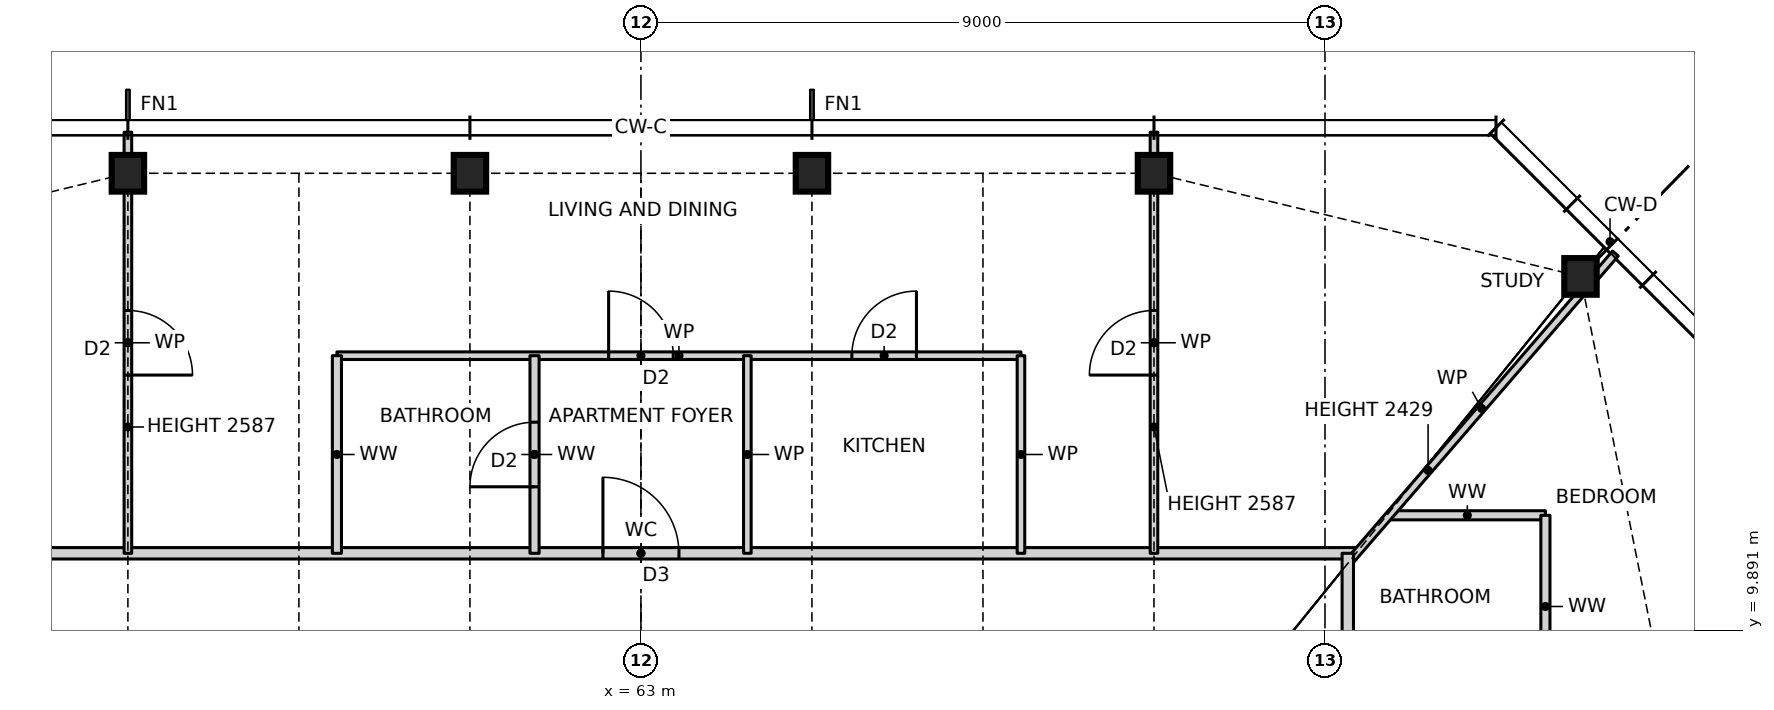
"""IFC4 building model, lengths in metres.
Left out: names, types, materials, properties, quantities, classifications, styles, units other than length and angle.
Written with IfcOpenShell. Run it as: python <this file> out.ifc"""

import sys

from ifc_helpers import new_model, si_unit, direction, frame, frame_2d, origin, origin_2d, place, context, subcontext, project, spatial, rectangle, i_section, extrude, element, fill, save


model = new_model("IFC4")
c1 = context("Model", 3, precision=1e-05, world=origin(), true_north=direction((0.0, 1.0)))
c2 = subcontext(c1, "Body", "Model", "MODEL_VIEW")
j1 = project(units=[si_unit("LENGTHUNIT", "METRE"), si_unit("PLANEANGLEUNIT", "RADIAN")], contexts=[c1])
p1 = place(None, origin())
s1 = spatial("IfcSite", under=j1, at=p1, CompositionType="ELEMENT")
p2 = place(p1, origin())
s2 = spatial("IfcBuilding", under=s1, at=p2, CompositionType="ELEMENT")
p3 = place(p2, frame((0.0, 0.0, 101.5)))
s3 = spatial("IfcBuildingStorey", under=s2, at=p3, CompositionType="ELEMENT", Elevation=101.5)
for number, where, z_axis, x_axis in (
    (1, (75.361, 14.543, 0.0), (0.0, 0.0, 1.0), (1.0, 0.0, 0.0)),
    (2, (69.75, 15.9, 0.0), (0.0, 0.0, 1.0), (1.0, 0.0, 0.0)),
    (3, (65.25, 15.9, 0.0), (0.0, 0.0, 1.0), (1.0, 0.0, 0.0)),
    (4, (60.75, 15.9, 0.0), (0.0, 0.0, 1.0), (1.0, 0.0, 0.0)),
    (5, (56.25, 15.9, 0.0), (0.0, 0.0, 1.0), (1.0, 0.0, 0.0)),
):
    element("IfcColumn", number, at=place(p3, frame(where, z_axis=z_axis, x_axis=x_axis)), inside=s3, PredefinedType="COLUMN", context=c2, shape_type="SweptSolid", body=[
        extrude(i_section(OverallWidth=0.427, OverallDepth=0.483, WebThickness=0.051, FlangeThickness=0.082, at=origin_2d()), origin(), (0.0, 0.0, 1.0), 3.5),
    ])
p4 = place(p3, frame((53.586, 10.9, 0.0), z_axis=(0.0, 0.0, 1.0), x_axis=(1.0, 0.0, 0.0)))
e6 = element("IfcWall", 6, at=p4, inside=s3, PredefinedType="PARTITIONING", context=c2, shape_type="SweptSolid", body=[
    extrude(rectangle(XDim=18.828, YDim=0.15, at=frame_2d((9.414, 0.0))), origin(), (0.0, 0.0, 1.0), 3.27),
])
p5 = place(p4, frame((8.914, 0.0, 0.0)))
e7 = element("IfcOpeningElement", 7, at=p5, cuts=e6, PredefinedType="OPENING", context=c2, shape_type="SweptSolid", body=[
    extrude(rectangle(XDim=1.0, YDim=2.1, at=frame_2d((0.5, 1.05))), frame((0.0, 0.085, 0.0), z_axis=(0.0, -1.0, 0.0), x_axis=(1.0, 0.0, 0.0)), (0.0, 0.0, 1.0), 0.17),
])
p6 = place(p3, frame((72.845, 11.4, 0.0), z_axis=(0.0, 0.0, 1.0), x_axis=(1.0, 0.0, 0.0)))
e8 = element("IfcWall", 8, at=p6, inside=s3, PredefinedType="PARTITIONING", context=c2, shape_type="SweptSolid", body=[
    extrude(rectangle(XDim=2.055, YDim=0.12, at=frame_2d((1.027, 0.0))), origin(), (0.0, 0.0, 1.0), 3.27),
])
p7 = place(p3, frame((59.0, 13.5, 0.0), z_axis=(0.0, 0.0, 1.0), x_axis=(1.0, 0.0, 0.0)))
e9 = element("IfcWall", 9, at=p7, inside=s3, PredefinedType="PARTITIONING", context=c2, shape_type="SweptSolid", body=[
    extrude(rectangle(XDim=9.0, YDim=0.1, at=frame_2d((4.5, 0.0))), origin(), (0.0, 0.0, 1.0), 3.27),
])
p8 = place(p7, frame((6.775, 0.0, 0.0)))
e10 = element("IfcOpeningElement", 10, at=p8, cuts=e9, PredefinedType="OPENING", context=c2, shape_type="SweptSolid", body=[
    extrude(rectangle(XDim=0.85, YDim=2.1, at=frame_2d((0.425, 1.05))), frame((0.0, 0.06, 0.0), z_axis=(0.0, -1.0, 0.0), x_axis=(1.0, 0.0, 0.0)), (0.0, 0.0, 1.0), 0.12),
])
p9 = place(p7, frame((3.575, 0.0, 0.0)))
e11 = element("IfcOpeningElement", 11, at=p9, cuts=e9, PredefinedType="OPENING", context=c2, shape_type="SweptSolid", body=[
    extrude(rectangle(XDim=0.85, YDim=2.1, at=frame_2d((0.425, 1.05))), frame((0.0, 0.06, 0.0), z_axis=(0.0, -1.0, 0.0), x_axis=(1.0, 0.0, 0.0)), (0.0, 0.0, 1.0), 0.12),
])
p10 = place(p3, frame((72.3, 10.768, 0.0), z_axis=(0.0, 0.0, 1.0), x_axis=(0.653709560919, 0.756745538449, 0.0)))
e12 = element("IfcWall", 12, at=p10, inside=s3, PredefinedType="PARTITIONING", context=c2, shape_type="SweptSolid", body=[
    extrude(rectangle(XDim=5.386, YDim=0.1, at=frame_2d((2.693, 0.0))), origin(), (0.0, 0.0, 1.0), 2.429),
])
p11 = place(p3, frame((74.9, 9.0, 0.0), z_axis=(0.0, 0.0, 1.0), x_axis=(0.0, 1.0, 0.0)))
e13 = element("IfcWall", 13, at=p11, inside=s3, PredefinedType="PARTITIONING", context=c2, shape_type="SweptSolid", body=[
    extrude(rectangle(XDim=2.4, YDim=0.12, at=frame_2d((1.2, 0.0))), origin(), (0.0, 0.0, 1.0), 3.27),
])
p12 = place(p3, frame((72.3, -10.768, 0.0), z_axis=(0.0, 0.0, 1.0), x_axis=(0.0, 1.0, 0.0)))
e14 = element("IfcWall", 14, at=p12, inside=s3, PredefinedType="PARTITIONING", context=c2, shape_type="SweptSolid", body=[
    extrude(rectangle(XDim=21.668, YDim=0.15, at=frame_2d((10.834, 0.0))), origin(), (0.0, 0.0, 1.0), 3.27),
])
p13 = place(p12, frame((6.268, 0.0, 0.0)))
e15 = element("IfcOpeningElement", 15, at=p13, cuts=e14, PredefinedType="OPENING", context=c2, shape_type="SweptSolid", body=[
    extrude(rectangle(XDim=1.0, YDim=2.1, at=frame_2d((0.5, 1.05))), frame((0.0, 0.085, 0.0), z_axis=(0.0, -1.0, 0.0), x_axis=(1.0, 0.0, 0.0)), (0.0, 0.0, 1.0), 0.17),
])
p14 = place(p12, frame((16.168, 0.0, 0.0)))
e16 = element("IfcOpeningElement", 16, at=p14, cuts=e14, PredefinedType="OPENING", context=c2, shape_type="SweptSolid", body=[
    extrude(rectangle(XDim=1.0, YDim=2.1, at=frame_2d((0.5, 1.05))), frame((0.0, 0.085, 0.0), z_axis=(0.0, -1.0, 0.0), x_axis=(1.0, 0.0, 0.0)), (0.0, 0.0, 1.0), 0.17),
])
p15 = place(p3, frame((69.75, 10.9, 0.0), z_axis=(0.0, 0.0, 1.0), x_axis=(0.0, 1.0, 0.0)))
e17 = element("IfcWall", 17, at=p15, inside=s3, PredefinedType="PARTITIONING", context=c2, shape_type="SweptSolid", body=[
    extrude(rectangle(XDim=5.54, YDim=0.1, at=frame_2d((2.77, 0.0))), origin(), (0.0, 0.0, 1.0), 2.587),
])
p16 = place(p15, frame((2.345, 0.0, 0.0)))
e18 = element("IfcOpeningElement", 18, at=p16, cuts=e17, PredefinedType="OPENING", context=c2, shape_type="SweptSolid", body=[
    extrude(rectangle(XDim=0.85, YDim=2.1, at=frame_2d((0.425, 1.05))), frame((0.0, 0.06, 0.0), z_axis=(0.0, -1.0, 0.0), x_axis=(1.0, 0.0, 0.0)), (0.0, 0.0, 1.0), 0.12),
])
for number, where, z_axis, x_axis in (
    (19, (68.0, 10.9, 0.0), (0.0, 0.0, 1.0), (0.0, 1.0, 0.0)),
    (20, (64.4, 10.9, 0.0), (0.0, 0.0, 1.0), (0.0, 1.0, 0.0)),
):
    element("IfcWall", number, at=place(p3, frame(where, z_axis=z_axis, x_axis=x_axis)), inside=s3, PredefinedType="PARTITIONING", context=c2, shape_type="SweptSolid", body=[
        extrude(rectangle(XDim=2.6, YDim=0.1, at=frame_2d((1.3, 0.0))), origin(), (0.0, 0.0, 1.0), 3.27),
    ])
p17 = place(p3, frame((61.6, 10.9, 0.0), z_axis=(0.0, 0.0, 1.0), x_axis=(0.0, 1.0, 0.0)))
e21 = element("IfcWall", 21, at=p17, inside=s3, PredefinedType="PARTITIONING", context=c2, shape_type="SweptSolid", body=[
    extrude(rectangle(XDim=2.6, YDim=0.12, at=frame_2d((1.3, 0.0))), origin(), (0.0, 0.0, 1.0), 3.27),
])
p18 = place(p17, frame((0.875, 0.0, 0.0)))
e22 = element("IfcOpeningElement", 22, at=p18, cuts=e21, PredefinedType="OPENING", context=c2, shape_type="SweptSolid", body=[
    extrude(rectangle(XDim=0.85, YDim=2.1, at=frame_2d((0.425, 1.05))), frame((0.0, 0.07, 0.0), z_axis=(0.0, -1.0, 0.0), x_axis=(1.0, 0.0, 0.0)), (0.0, 0.0, 1.0), 0.14),
])
p19 = place(p3, frame((59.0, 10.9, 0.0), z_axis=(0.0, 0.0, 1.0), x_axis=(0.0, 1.0, 0.0)))
e23 = element("IfcWall", 23, at=p19, inside=s3, PredefinedType="PARTITIONING", context=c2, shape_type="SweptSolid", body=[
    extrude(rectangle(XDim=2.6, YDim=0.12, at=frame_2d((1.3, 0.0))), origin(), (0.0, 0.0, 1.0), 3.27),
])
p20 = place(p3, frame((56.25, 10.9, 0.0), z_axis=(0.0, 0.0, 1.0), x_axis=(0.0, 1.0, 0.0)))
e24 = element("IfcWall", 24, at=p20, inside=s3, PredefinedType="PARTITIONING", context=c2, shape_type="SweptSolid", body=[
    extrude(rectangle(XDim=5.54, YDim=0.1, at=frame_2d((2.77, 0.0))), origin(), (0.0, 0.0, 1.0), 2.587),
])
p21 = place(p20, frame((2.345, 0.0, 0.0)))
e25 = element("IfcOpeningElement", 25, at=p21, cuts=e24, PredefinedType="OPENING", context=c2, shape_type="SweptSolid", body=[
    extrude(rectangle(XDim=0.85, YDim=2.1, at=frame_2d((0.425, 1.05))), frame((0.0, 0.06, 0.0), z_axis=(0.0, -1.0, 0.0), x_axis=(1.0, 0.0, 0.0)), (0.0, 0.0, 1.0), 0.12),
])
p22 = place(p8, origin())
e26 = element("IfcDoor", 26, at=p22, inside=s3, OperationType="SINGLE_SWING_RIGHT", PredefinedType="DOOR", context=c2, shape_type="SweptSolid", body=[
    extrude(rectangle(XDim=0.85, YDim=2.1, at=frame_2d((0.425, 1.05))), frame((0.0, 0.025, 0.0), z_axis=(0.0, -1.0, 0.0), x_axis=(1.0, 0.0, 0.0)), (0.0, 0.0, 1.0), 0.05),
])
fill(e10, e26)
p23 = place(p5, origin())
e27 = element("IfcDoor", 27, at=p23, inside=s3, OperationType="SINGLE_SWING_LEFT", PredefinedType="DOOR", context=c2, shape_type="SweptSolid", body=[
    extrude(rectangle(XDim=1.0, YDim=2.1, at=frame_2d((0.5, 1.05))), frame((0.0, 0.025, 0.0), z_axis=(0.0, -1.0, 0.0), x_axis=(1.0, 0.0, 0.0)), (0.0, 0.0, 1.0), 0.05),
])
fill(e7, e27)
p24 = place(p9, origin())
e28 = element("IfcDoor", 28, at=p24, inside=s3, OperationType="SINGLE_SWING_LEFT", PredefinedType="DOOR", context=c2, shape_type="SweptSolid", body=[
    extrude(rectangle(XDim=0.85, YDim=2.1, at=frame_2d((0.425, 1.05))), frame((0.0, 0.025, 0.0), z_axis=(0.0, -1.0, 0.0), x_axis=(1.0, 0.0, 0.0)), (0.0, 0.0, 1.0), 0.05),
])
fill(e11, e28)
p25 = place(p18, origin())
e29 = element("IfcDoor", 29, at=p25, inside=s3, OperationType="SINGLE_SWING_LEFT", PredefinedType="DOOR", context=c2, shape_type="SweptSolid", body=[
    extrude(rectangle(XDim=0.85, YDim=2.1, at=frame_2d((0.425, 1.05))), frame((0.0, 0.025, 0.0), z_axis=(0.0, -1.0, 0.0), x_axis=(1.0, 0.0, 0.0)), (0.0, 0.0, 1.0), 0.05),
])
fill(e22, e29)
p26 = place(p16, origin())
e30 = element("IfcDoor", 30, at=p26, inside=s3, OperationType="SINGLE_SWING_LEFT", PredefinedType="DOOR", context=c2, shape_type="SweptSolid", body=[
    extrude(rectangle(XDim=0.85, YDim=2.1, at=frame_2d((0.425, 1.05))), frame((0.0, 0.025, 0.0), z_axis=(0.0, -1.0, 0.0), x_axis=(1.0, 0.0, 0.0)), (0.0, 0.0, 1.0), 0.05),
])
fill(e18, e30)
p27 = place(p21, frame((0.85, 0.0, 0.0), z_axis=(0.0, 0.0, 1.0), x_axis=(-1.0, 0.0, 0.0)))
e31 = element("IfcDoor", 31, at=p27, inside=s3, OperationType="SINGLE_SWING_RIGHT", PredefinedType="DOOR", context=c2, shape_type="SweptSolid", body=[
    extrude(rectangle(XDim=0.85, YDim=2.1, at=frame_2d((0.425, 1.05))), frame((0.0, 0.025, 0.0), z_axis=(0.0, -1.0, 0.0), x_axis=(1.0, 0.0, 0.0)), (0.0, 0.0, 1.0), 0.05),
])
fill(e25, e31)
save(model, sys.argv[1])
